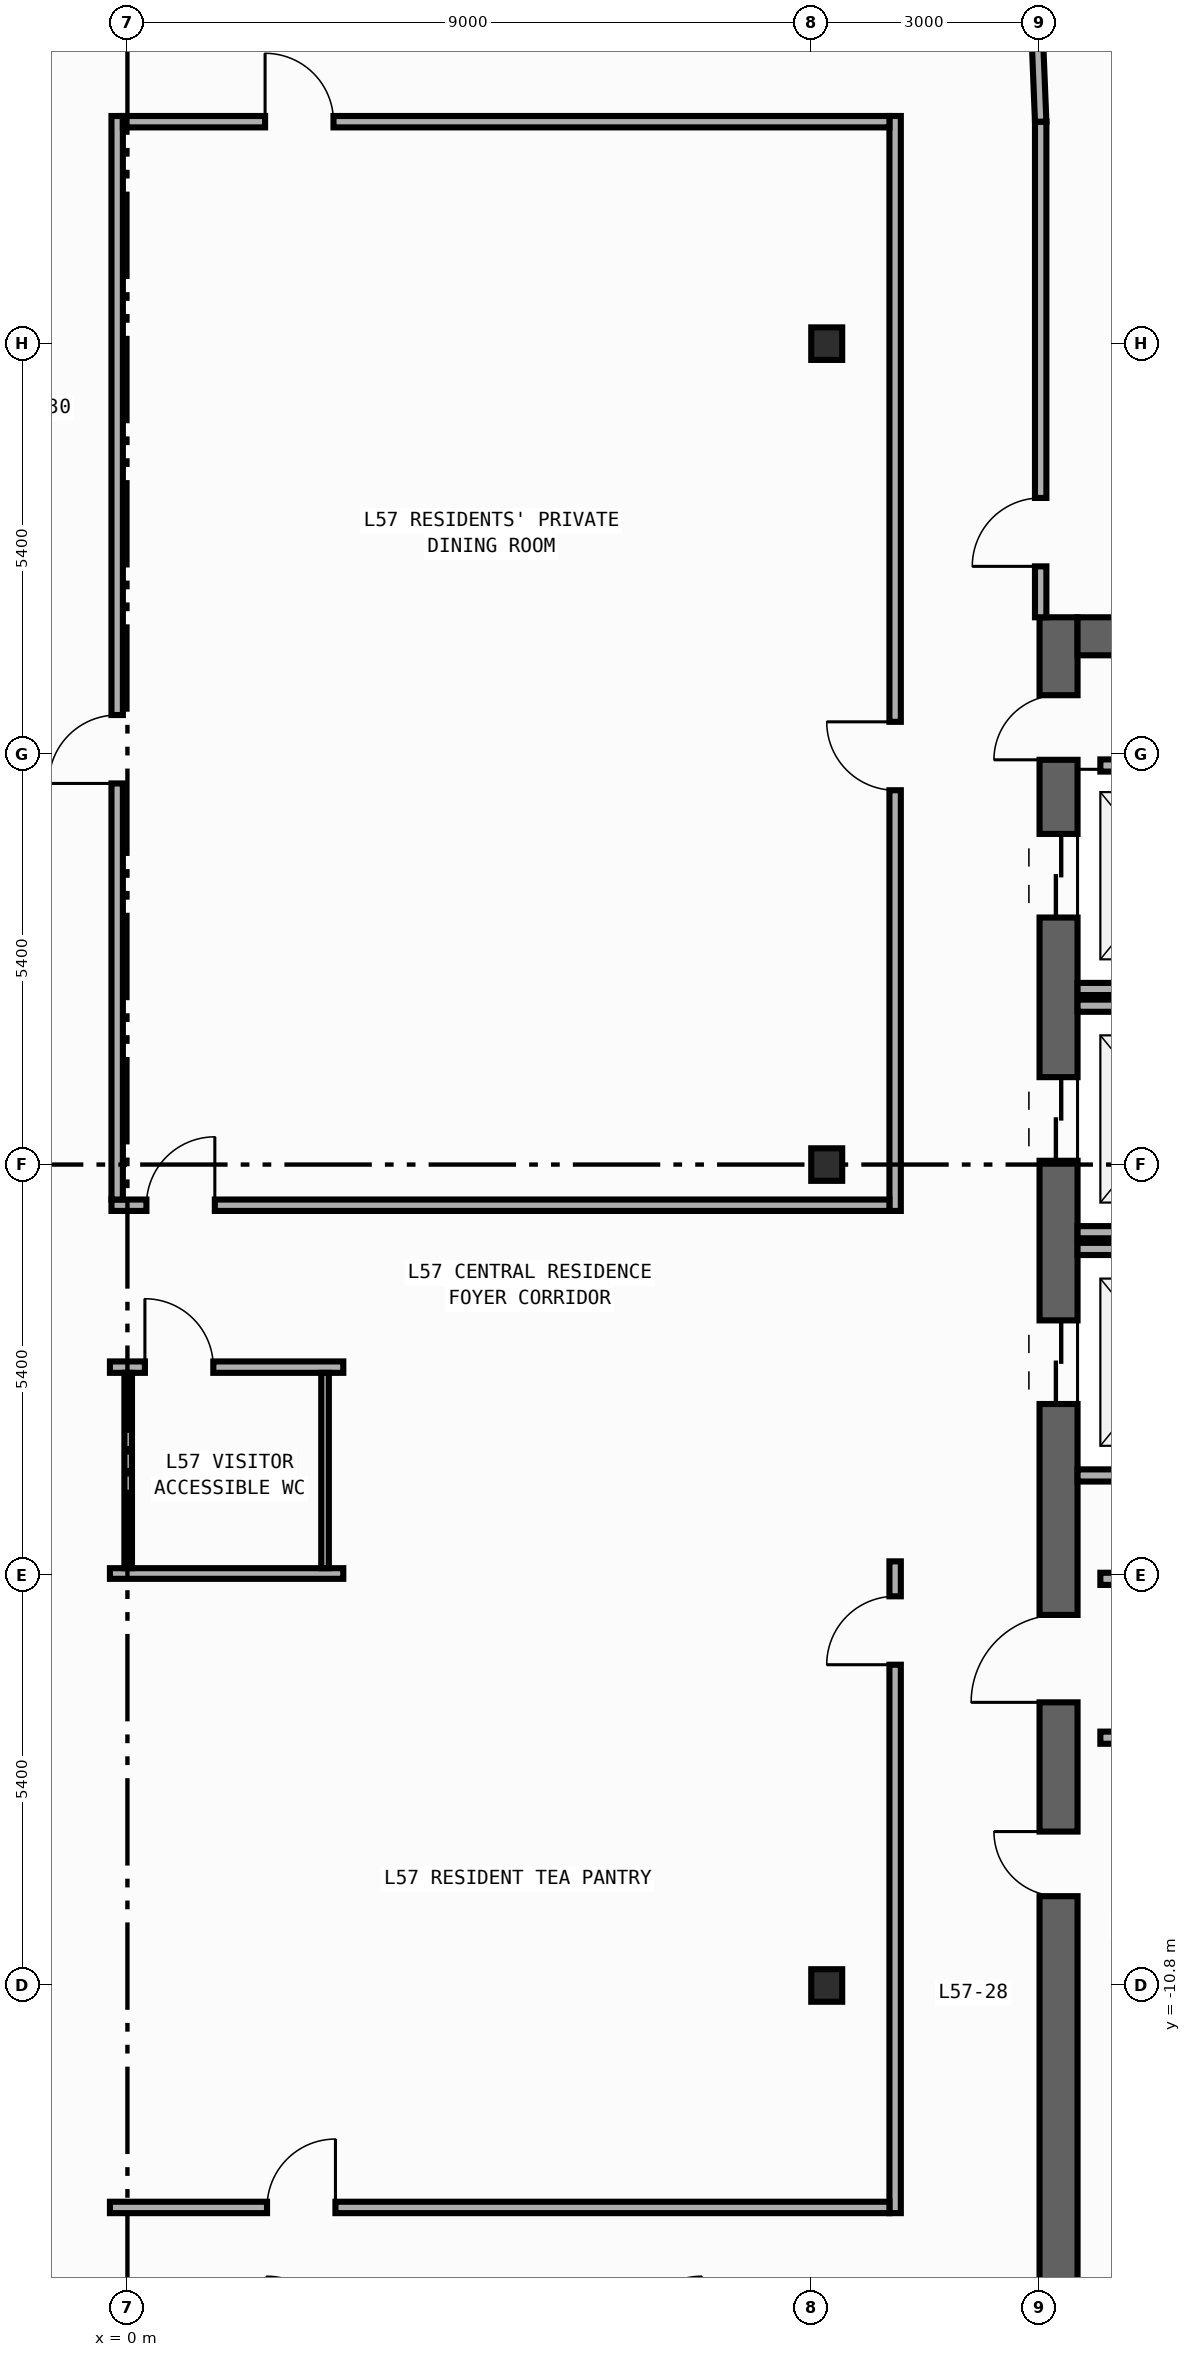
"""IFC4 building model, lengths in metres.
Left out: names, types, materials, properties, quantities, classifications, styles, units other than length and angle.
Written with IfcOpenShell. Run it as: python <this file> out.ifc"""

import sys

from ifc_helpers import new_model, si_unit, direction, frame, frame_2d, origin, origin_2d, place, context, subcontext, project, spatial, rectangle, i_section, extrude, element, fill, save


model = new_model("IFC4")
c1 = context("Model", 3, precision=1e-05, world=origin(), true_north=direction((0.0, 1.0)))
c2 = subcontext(c1, "Body", "Model", "MODEL_VIEW")
j1 = project(units=[si_unit("LENGTHUNIT", "METRE"), si_unit("PLANEANGLEUNIT", "RADIAN")], contexts=[c1])
p1 = place(None, origin())
s1 = spatial("IfcSite", under=j1, at=p1, CompositionType="ELEMENT")
p2 = place(p1, origin())
s2 = spatial("IfcBuilding", under=s1, at=p2, CompositionType="ELEMENT")
p3 = place(p2, frame((0.0, 0.0, 244.0)))
s3 = spatial("IfcBuildingStorey", under=s2, at=p3, CompositionType="ELEMENT", Elevation=244.0)
p4 = place(p3, frame((12.25, -19.8, 0.0), z_axis=(0.0, 0.0, 1.0), x_axis=(0.0, 1.0, 0.0)))
e1 = element("IfcWall", 1, at=p4, inside=s3, PredefinedType="SHEAR", context=c2, shape_type="SweptSolid", body=[
    extrude(rectangle(XDim=27.0, YDim=0.5, at=frame_2d((13.5, 0.0))), origin(), (0.0, 0.0, 1.0), 3.34),
])
p5 = place(p4, frame((23.05, 0.0, 0.0)))
e2 = element("IfcOpeningElement", 2, at=p5, cuts=e1, PredefinedType="OPENING", context=c2, shape_type="SweptSolid", body=[
    extrude(rectangle(XDim=1.1, YDim=2.2, at=frame_2d((0.55, 1.1))), frame((0.0, 0.26, 0.0), z_axis=(0.0, -1.0, 0.0), x_axis=(1.0, 0.0, 0.0)), (0.0, 0.0, 1.0), 0.52),
])
p6 = place(p4, frame((19.85, 0.0, 0.0)))
e3 = element("IfcOpeningElement", 3, at=p6, cuts=e1, PredefinedType="OPENING", context=c2, shape_type="SweptSolid", body=[
    extrude(rectangle(XDim=1.1, YDim=2.2, at=frame_2d((0.55, 1.1))), frame((0.0, 0.26, 0.0), z_axis=(0.0, -1.0, 0.0), x_axis=(1.0, 0.0, 0.0)), (0.0, 0.0, 1.0), 0.52),
])
p7 = place(p4, frame((16.65, 0.0, 0.0)))
e4 = element("IfcOpeningElement", 4, at=p7, cuts=e1, PredefinedType="OPENING", context=c2, shape_type="SweptSolid", body=[
    extrude(rectangle(XDim=1.1, YDim=2.2, at=frame_2d((0.55, 1.1))), frame((0.0, 0.26, 0.0), z_axis=(0.0, -1.0, 0.0), x_axis=(1.0, 0.0, 0.0)), (0.0, 0.0, 1.0), 0.52),
])
p8 = place(p4, frame((10.175, 0.0, 0.0)))
e5 = element("IfcOpeningElement", 5, at=p8, cuts=e1, PredefinedType="OPENING", context=c2, shape_type="SweptSolid", body=[
    extrude(rectangle(XDim=0.85, YDim=2.1, at=frame_2d((0.425, 1.05))), frame((0.0, 0.26, 0.0), z_axis=(0.0, -1.0, 0.0), x_axis=(1.0, 0.0, 0.0)), (0.0, 0.0, 1.0), 0.52),
])
p9 = place(p4, frame((12.725, 0.0, 0.0)))
e6 = element("IfcOpeningElement", 6, at=p9, cuts=e1, PredefinedType="OPENING", context=c2, shape_type="SweptSolid", body=[
    extrude(rectangle(XDim=1.15, YDim=2.2, at=frame_2d((0.575, 1.1))), frame((0.0, 0.26, 0.0), z_axis=(0.0, -1.0, 0.0), x_axis=(1.0, 0.0, 0.0)), (0.0, 0.0, 1.0), 0.52),
])
p10 = place(p4, frame((25.125, 0.0, 0.0)))
e7 = element("IfcOpeningElement", 7, at=p10, cuts=e1, PredefinedType="OPENING", context=c2, shape_type="SweptSolid", body=[
    extrude(rectangle(XDim=0.85, YDim=2.1, at=frame_2d((0.425, 1.05))), frame((0.0, 0.26, 0.0), z_axis=(0.0, -1.0, 0.0), x_axis=(1.0, 0.0, 0.0)), (0.0, 0.0, 1.0), 0.52),
])
p11 = place(p3, frame((12.5, 6.95, 0.0), z_axis=(0.0, 0.0, 1.0), x_axis=(1.0, 0.0, 0.0)))
e8 = element("IfcWall", 8, at=p11, inside=s3, PredefinedType="SHEAR", context=c2, shape_type="SweptSolid", body=[
    extrude(rectangle(XDim=7.4, YDim=0.5, at=frame_2d((3.7, 0.0))), origin(), (0.0, 0.0, 1.0), 3.34),
])
for number, where, z_axis, x_axis in (
    (9, (9.2, -10.8, 0.0), (0.0, 0.0, 1.0), (1.0, 0.0, 0.0)),
    (10, (9.2, 0.0, 0.0), (0.0, 0.0, 1.0), (1.0, 0.0, 0.0)),
    (11, (9.2, 10.8, 0.0), (0.0, 0.0, 1.0), (1.0, 0.0, 0.0)),
):
    element("IfcColumn", number, at=place(p3, frame(where, z_axis=z_axis, x_axis=x_axis)), inside=s3, PredefinedType="COLUMN", context=c2, shape_type="SweptSolid", body=[
        extrude(i_section(OverallWidth=0.407, OverallDepth=0.428, WebThickness=0.02, FlangeThickness=0.035, FilletRadius=0.022, at=origin_2d()), origin(), (0.0, 0.0, 1.0), 3.6),
    ])
for number, where, z_axis, x_axis in (
    (12, (12.5, 2.31, 0.0), (0.0, 0.0, 1.0), (1.0, 0.0, 0.0)),
    (13, (12.5, -0.89, 0.0), (0.0, 0.0, 1.0), (1.0, 0.0, 0.0)),
    (14, (12.5, 2.09, 0.0), (0.0, 0.0, 1.0), (1.0, 0.0, 0.0)),
    (15, (12.5, -4.09, 0.0), (0.0, 0.0, 1.0), (1.0, 0.0, 0.0)),
    (16, (12.5, -1.11, 0.0), (0.0, 0.0, 1.0), (1.0, 0.0, 0.0)),
):
    element("IfcWall", number, at=place(p3, frame(where, z_axis=z_axis, x_axis=x_axis)), inside=s3, PredefinedType="STANDARD", context=c2, shape_type="SweptSolid", body=[
        extrude(rectangle(XDim=2.49, YDim=0.16, at=frame_2d((1.245, 0.0))), origin(), (0.0, 0.0, 1.0), 3.34),
    ])
for number, where, z_axis, x_axis in (
    (17, (12.8, -5.45, 0.0), (0.0, 0.0, 1.0), (1.0, 0.0, 0.0)),
    (18, (12.8, -7.54, 0.0), (0.0, 0.0, 1.0), (1.0, 0.0, 0.0)),
    (19, (12.8, 5.25, 0.0), (0.0, 0.0, 1.0), (1.0, 0.0, 0.0)),
):
    element("IfcWall", number, at=place(p3, frame(where, z_axis=z_axis, x_axis=x_axis)), inside=s3, PredefinedType="STANDARD", context=c2, shape_type="SweptSolid", body=[
        extrude(rectangle(XDim=2.6, YDim=0.16, at=frame_2d((1.3, 0.0))), origin(), (0.0, 0.0, 1.0), 3.34),
    ])
p12 = place(p3, frame((12.015, 7.2, 0.0), z_axis=(0.0, 0.0, 1.0), x_axis=(0.0, 1.0, 0.0)))
e20 = element("IfcWall", 20, at=p12, inside=s3, PredefinedType="PARTITIONING", context=c2, shape_type="SweptSolid", body=[
    extrude(rectangle(XDim=6.52, YDim=0.15, at=frame_2d((3.26, 0.0))), origin(), (0.0, 0.0, 1.0), 3.34),
])
p13 = place(p12, frame((0.67, 0.0, 0.0)))
e21 = element("IfcOpeningElement", 21, at=p13, cuts=e20, PredefinedType="OPENING", context=c2, shape_type="SweptSolid", body=[
    extrude(rectangle(XDim=0.9, YDim=2.15, at=frame_2d((0.45, 1.075))), frame((0.0, 0.085, 0.0), z_axis=(0.0, -1.0, 0.0), x_axis=(1.0, 0.0, 0.0)), (0.0, 0.0, 1.0), 0.17),
])
p14 = place(p3, frame((10.1, -0.61, 0.0), z_axis=(0.0, 0.0, 1.0), x_axis=(0.0, 1.0, 0.0)))
e22 = element("IfcWall", 22, at=p14, inside=s3, PredefinedType="PARTITIONING", context=c2, shape_type="SweptSolid", body=[
    extrude(rectangle(XDim=14.405, YDim=0.15, at=frame_2d((7.203, 0.0))), origin(), (0.0, 0.0, 1.0), 3.34),
])
p15 = place(p14, frame((5.535, 0.0, 0.0)))
e23 = element("IfcOpeningElement", 23, at=p15, cuts=e22, PredefinedType="OPENING", context=c2, shape_type="SweptSolid", body=[
    extrude(rectangle(XDim=0.9, YDim=2.15, at=frame_2d((0.45, 1.075))), frame((0.0, 0.085, 0.0), z_axis=(0.0, -1.0, 0.0), x_axis=(1.0, 0.0, 0.0)), (0.0, 0.0, 1.0), 0.17),
])
p16 = place(p3, frame((10.1, -13.795, 0.0), z_axis=(0.0, 0.0, 1.0), x_axis=(0.0, 1.0, 0.0)))
e24 = element("IfcWall", 24, at=p16, inside=s3, PredefinedType="PARTITIONING", context=c2, shape_type="SweptSolid", body=[
    extrude(rectangle(XDim=8.575, YDim=0.15, at=frame_2d((4.288, 0.0))), origin(), (0.0, 0.0, 1.0), 3.34),
])
p17 = place(p16, frame((7.215, 0.0, 0.0)))
e25 = element("IfcOpeningElement", 25, at=p17, cuts=e24, PredefinedType="OPENING", context=c2, shape_type="SweptSolid", body=[
    extrude(rectangle(XDim=0.9, YDim=2.15, at=frame_2d((0.45, 1.075))), frame((0.0, 0.085, 0.0), z_axis=(0.0, -1.0, 0.0), x_axis=(1.0, 0.0, 0.0)), (0.0, 0.0, 1.0), 0.17),
])
p18 = place(p3, frame((-0.21, -0.535, 0.0), z_axis=(0.0, 0.0, 1.0), x_axis=(1.0, 0.0, 0.0)))
e26 = element("IfcWall", 26, at=p18, inside=s3, PredefinedType="PARTITIONING", context=c2, shape_type="SweptSolid", body=[
    extrude(rectangle(XDim=10.235, YDim=0.15, at=frame_2d((5.117, 0.0))), origin(), (0.0, 0.0, 1.0), 3.34),
])
p19 = place(p18, frame((0.46, 0.0, 0.0)))
e27 = element("IfcOpeningElement", 27, at=p19, cuts=e26, PredefinedType="OPENING", context=c2, shape_type="SweptSolid", body=[
    extrude(rectangle(XDim=0.9, YDim=2.15, at=frame_2d((0.45, 1.075))), frame((0.0, 0.085, 0.0), z_axis=(0.0, -1.0, 0.0), x_axis=(1.0, 0.0, 0.0)), (0.0, 0.0, 1.0), 0.17),
])
p20 = place(p3, frame((-0.23, -2.665, 0.0), z_axis=(0.0, 0.0, 1.0), x_axis=(1.0, 0.0, 0.0)))
e28 = element("IfcWall", 28, at=p20, inside=s3, PredefinedType="PARTITIONING", context=c2, shape_type="SweptSolid", body=[
    extrude(rectangle(XDim=3.07, YDim=0.15, at=frame_2d((1.535, 0.0))), origin(), (0.0, 0.0, 1.0), 3.34),
])
p21 = place(p20, frame((0.46, 0.0, 0.0)))
e29 = element("IfcOpeningElement", 29, at=p21, cuts=e28, PredefinedType="OPENING", context=c2, shape_type="SweptSolid", body=[
    extrude(rectangle(XDim=0.9, YDim=2.15, at=frame_2d((0.45, 1.075))), frame((0.0, 0.085, 0.0), z_axis=(0.0, -1.0, 0.0), x_axis=(1.0, 0.0, 0.0)), (0.0, 0.0, 1.0), 0.17),
])
p22 = place(p3, frame((-0.135, -0.46, 0.0), z_axis=(0.0, 0.0, 1.0), x_axis=(0.0, 1.0, 0.0)))
e30 = element("IfcWall", 30, at=p22, inside=s3, PredefinedType="PARTITIONING", context=c2, shape_type="SweptSolid", body=[
    extrude(rectangle(XDim=14.255, YDim=0.15, at=frame_2d((7.127, 0.0))), origin(), (0.0, 0.0, 1.0), 3.34),
])
p23 = place(p22, frame((5.474, 0.0, 0.0)))
e31 = element("IfcOpeningElement", 31, at=p23, cuts=e30, PredefinedType="OPENING", context=c2, shape_type="SweptSolid", body=[
    extrude(rectangle(XDim=0.9, YDim=2.15, at=frame_2d((0.45, 1.075))), frame((0.0, 0.085, 0.0), z_axis=(0.0, -1.0, 0.0), x_axis=(1.0, 0.0, 0.0)), (0.0, 0.0, 1.0), 0.17),
])
p24 = place(p3, frame((12.015, 13.72, 0.0), z_axis=(0.0, 0.0, 1.0), x_axis=(-0.040046877756, 0.99919780203, 0.0)))
e32 = element("IfcWall", 32, at=p24, inside=s3, PredefinedType="PARTITIONING", context=c2, shape_type="SweptSolid", body=[
    extrude(rectangle(XDim=1.731, YDim=0.15, at=frame_2d((0.866, 0.0))), origin(), (0.0, 0.0, 1.0), 3.34),
])
p25 = place(p3, frame((-0.06, 13.72, 0.0), z_axis=(0.0, 0.0, 1.0), x_axis=(1.0, 0.0, 0.0)))
e33 = element("IfcWall", 33, at=p25, inside=s3, PredefinedType="PARTITIONING", context=c2, shape_type="SweptSolid", body=[
    extrude(rectangle(XDim=10.085, YDim=0.15, at=frame_2d((5.042, 0.0))), origin(), (0.0, 0.0, 1.0), 3.34),
])
p26 = place(p25, frame((1.871, 0.0, 0.0)))
e34 = element("IfcOpeningElement", 34, at=p26, cuts=e33, PredefinedType="OPENING", context=c2, shape_type="SweptSolid", body=[
    extrude(rectangle(XDim=0.9, YDim=2.15, at=frame_2d((0.45, 1.075))), frame((0.0, 0.085, 0.0), z_axis=(0.0, -1.0, 0.0), x_axis=(1.0, 0.0, 0.0)), (0.0, 0.0, 1.0), 0.17),
])
p27 = place(p3, frame((-0.23, -13.72, 0.0), z_axis=(0.0, 0.0, 1.0), x_axis=(1.0, 0.0, 0.0)))
e35 = element("IfcWall", 35, at=p27, inside=s3, PredefinedType="PARTITIONING", context=c2, shape_type="SweptSolid", body=[
    extrude(rectangle(XDim=10.255, YDim=0.15, at=frame_2d((5.127, 0.0))), origin(), (0.0, 0.0, 1.0), 3.34),
])
p28 = place(p27, frame((2.067, 0.0, 0.0)))
e36 = element("IfcOpeningElement", 36, at=p28, cuts=e35, PredefinedType="OPENING", context=c2, shape_type="SweptSolid", body=[
    extrude(rectangle(XDim=0.9, YDim=2.15, at=frame_2d((0.45, 1.075))), frame((0.0, 0.085, 0.0), z_axis=(0.0, -1.0, 0.0), x_axis=(1.0, 0.0, 0.0)), (0.0, 0.0, 1.0), 0.17),
])
p29 = place(p3, frame((-0.23, -5.38, 0.0), z_axis=(0.0, 0.0, 1.0), x_axis=(1.0, 0.0, 0.0)))
e37 = element("IfcWall", 37, at=p29, inside=s3, PredefinedType="PARTITIONING", context=c2, shape_type="SweptSolid", body=[
    extrude(rectangle(XDim=3.07, YDim=0.14, at=frame_2d((1.535, 0.0))), origin(), (0.0, 0.0, 1.0), 3.34),
])
for number, where, z_axis, x_axis in (
    (38, (2.6, -2.74, 0.0), (0.0, 0.0, 1.0), (0.0, -1.0, 0.0)),
    (39, (0.01, -5.31, 0.0), (0.0, 0.0, 1.0), (0.0, 1.0, 0.0)),
):
    element("IfcWall", number, at=place(p3, frame(where, z_axis=z_axis, x_axis=x_axis)), inside=s3, PredefinedType="PARTITIONING", context=c2, shape_type="SweptSolid", body=[
        extrude(rectangle(XDim=2.57, YDim=0.1, at=frame_2d((1.285, 0.0))), origin(), (0.0, 0.0, 1.0), 3.34),
    ])
p30 = place(p5, origin())
e40 = element("IfcDoor", 40, at=p30, inside=s3, OperationType="DOUBLE_DOOR_SLIDING", PredefinedType="DOOR", context=c2, shape_type="SweptSolid", body=[
    extrude(rectangle(XDim=1.1, YDim=2.2, at=frame_2d((0.55, 1.1))), frame((0.0, 0.025, 0.0), z_axis=(0.0, -1.0, 0.0), x_axis=(1.0, 0.0, 0.0)), (0.0, 0.0, 1.0), 0.05),
])
fill(e2, e40)
p31 = place(p6, origin())
e41 = element("IfcDoor", 41, at=p31, inside=s3, OperationType="DOUBLE_DOOR_SLIDING", PredefinedType="DOOR", context=c2, shape_type="SweptSolid", body=[
    extrude(rectangle(XDim=1.1, YDim=2.2, at=frame_2d((0.55, 1.1))), frame((0.0, 0.025, 0.0), z_axis=(0.0, -1.0, 0.0), x_axis=(1.0, 0.0, 0.0)), (0.0, 0.0, 1.0), 0.05),
])
fill(e3, e41)
p32 = place(p7, origin())
e42 = element("IfcDoor", 42, at=p32, inside=s3, OperationType="DOUBLE_DOOR_SLIDING", PredefinedType="DOOR", context=c2, shape_type="SweptSolid", body=[
    extrude(rectangle(XDim=1.1, YDim=2.2, at=frame_2d((0.55, 1.1))), frame((0.0, 0.025, 0.0), z_axis=(0.0, -1.0, 0.0), x_axis=(1.0, 0.0, 0.0)), (0.0, 0.0, 1.0), 0.05),
])
fill(e4, e42)
p33 = place(p8, origin())
e43 = element("IfcDoor", 43, at=p33, inside=s3, OperationType="SINGLE_SWING_RIGHT", PredefinedType="DOOR", context=c2, shape_type="SweptSolid", body=[
    extrude(rectangle(XDim=0.85, YDim=2.1, at=frame_2d((0.425, 1.05))), frame((0.0, 0.025, 0.0), z_axis=(0.0, -1.0, 0.0), x_axis=(1.0, 0.0, 0.0)), (0.0, 0.0, 1.0), 0.05),
])
fill(e5, e43)
p34 = place(p9, origin())
e44 = element("IfcDoor", 44, at=p34, inside=s3, OperationType="SINGLE_SWING_LEFT", PredefinedType="DOOR", context=c2, shape_type="SweptSolid", body=[
    extrude(rectangle(XDim=1.15, YDim=2.2, at=frame_2d((0.575, 1.1))), frame((0.0, 0.025, 0.0), z_axis=(0.0, -1.0, 0.0), x_axis=(1.0, 0.0, 0.0)), (0.0, 0.0, 1.0), 0.05),
])
fill(e6, e44)
p35 = place(p10, origin())
e45 = element("IfcDoor", 45, at=p35, inside=s3, OperationType="SINGLE_SWING_LEFT", PredefinedType="DOOR", context=c2, shape_type="SweptSolid", body=[
    extrude(rectangle(XDim=0.85, YDim=2.1, at=frame_2d((0.425, 1.05))), frame((0.0, 0.025, 0.0), z_axis=(0.0, -1.0, 0.0), x_axis=(1.0, 0.0, 0.0)), (0.0, 0.0, 1.0), 0.05),
])
fill(e7, e45)
p36 = place(p13, origin())
e46 = element("IfcDoor", 46, at=p36, inside=s3, OperationType="SINGLE_SWING_LEFT", PredefinedType="DOOR", context=c2, shape_type="SweptSolid", body=[
    extrude(rectangle(XDim=0.9, YDim=2.15, at=frame_2d((0.45, 1.075))), frame((0.0, 0.025, 0.0), z_axis=(0.0, -1.0, 0.0), x_axis=(1.0, 0.0, 0.0)), (0.0, 0.0, 1.0), 0.05),
])
fill(e21, e46)
p37 = place(p15, origin())
e47 = element("IfcDoor", 47, at=p37, inside=s3, OperationType="SINGLE_SWING_RIGHT", PredefinedType="DOOR", context=c2, shape_type="SweptSolid", body=[
    extrude(rectangle(XDim=0.9, YDim=2.15, at=frame_2d((0.45, 1.075))), frame((0.0, 0.025, 0.0), z_axis=(0.0, -1.0, 0.0), x_axis=(1.0, 0.0, 0.0)), (0.0, 0.0, 1.0), 0.05),
])
fill(e23, e47)
p38 = place(p17, origin())
e48 = element("IfcDoor", 48, at=p38, inside=s3, OperationType="SINGLE_SWING_LEFT", PredefinedType="DOOR", context=c2, shape_type="SweptSolid", body=[
    extrude(rectangle(XDim=0.9, YDim=2.15, at=frame_2d((0.45, 1.075))), frame((0.0, 0.025, 0.0), z_axis=(0.0, -1.0, 0.0), x_axis=(1.0, 0.0, 0.0)), (0.0, 0.0, 1.0), 0.05),
])
fill(e25, e48)
p39 = place(p19, origin())
e49 = element("IfcDoor", 49, at=p39, inside=s3, OperationType="SINGLE_SWING_RIGHT", PredefinedType="DOOR", context=c2, shape_type="SweptSolid", body=[
    extrude(rectangle(XDim=0.9, YDim=2.15, at=frame_2d((0.45, 1.075))), frame((0.0, 0.025, 0.0), z_axis=(0.0, -1.0, 0.0), x_axis=(1.0, 0.0, 0.0)), (0.0, 0.0, 1.0), 0.05),
])
fill(e27, e49)
p40 = place(p21, origin())
e50 = element("IfcDoor", 50, at=p40, inside=s3, OperationType="SINGLE_SWING_LEFT", PredefinedType="DOOR", context=c2, shape_type="SweptSolid", body=[
    extrude(rectangle(XDim=0.9, YDim=2.15, at=frame_2d((0.45, 1.075))), frame((0.0, 0.025, 0.0), z_axis=(0.0, -1.0, 0.0), x_axis=(1.0, 0.0, 0.0)), (0.0, 0.0, 1.0), 0.05),
])
fill(e29, e50)
p41 = place(p23, origin())
e51 = element("IfcDoor", 51, at=p41, inside=s3, OperationType="SINGLE_SWING_LEFT", PredefinedType="DOOR", context=c2, shape_type="SweptSolid", body=[
    extrude(rectangle(XDim=0.9, YDim=2.15, at=frame_2d((0.45, 1.075))), frame((0.0, 0.025, 0.0), z_axis=(0.0, -1.0, 0.0), x_axis=(1.0, 0.0, 0.0)), (0.0, 0.0, 1.0), 0.05),
])
fill(e31, e51)
p42 = place(p26, origin())
e52 = element("IfcDoor", 52, at=p42, inside=s3, OperationType="SINGLE_SWING_LEFT", PredefinedType="DOOR", context=c2, shape_type="SweptSolid", body=[
    extrude(rectangle(XDim=0.9, YDim=2.15, at=frame_2d((0.45, 1.075))), frame((0.0, 0.025, 0.0), z_axis=(0.0, -1.0, 0.0), x_axis=(1.0, 0.0, 0.0)), (0.0, 0.0, 1.0), 0.05),
])
fill(e34, e52)
p43 = place(p28, origin())
e53 = element("IfcDoor", 53, at=p43, inside=s3, OperationType="SINGLE_SWING_RIGHT", PredefinedType="DOOR", context=c2, shape_type="SweptSolid", body=[
    extrude(rectangle(XDim=0.9, YDim=2.15, at=frame_2d((0.45, 1.075))), frame((0.0, 0.025, 0.0), z_axis=(0.0, -1.0, 0.0), x_axis=(1.0, 0.0, 0.0)), (0.0, 0.0, 1.0), 0.05),
])
fill(e36, e53)
save(model, sys.argv[1])
